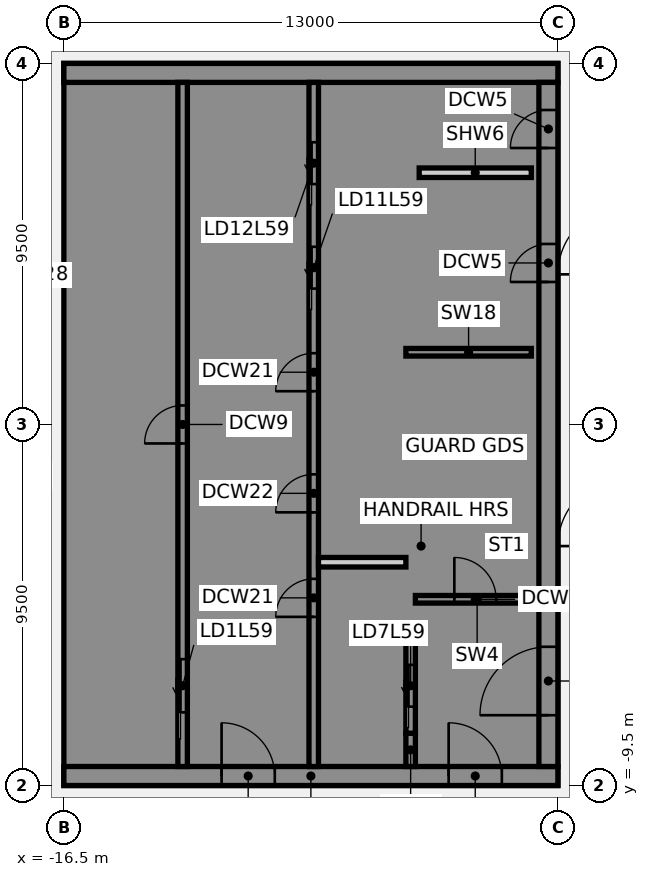
"""IFC4 building model, lengths in metres.
Left out: names, types, materials, properties, quantities, classifications, styles, units other than length and angle.
Written with IfcOpenShell. Run it as: python <this file> out.ifc"""

import sys

from ifc_helpers import new_model, si_unit, direction, frame, frame_2d, origin, place, context, subcontext, project, spatial, polyline, rectangle, outline, extrude, element, fill, save


model = new_model("IFC4")
c1 = context("Model", 3, precision=1e-05, world=origin(), true_north=direction((0.0, 1.0)))
c2 = subcontext(c1, "Body", "Model", "MODEL_VIEW")
j1 = project(units=[si_unit("LENGTHUNIT", "METRE"), si_unit("PLANEANGLEUNIT", "RADIAN")], contexts=[c1])
p1 = place(None, origin())
s1 = spatial("IfcSite", under=j1, at=p1, CompositionType="ELEMENT")
p2 = place(p1, origin())
s2 = spatial("IfcBuilding", under=s1, at=p2, CompositionType="ELEMENT")
p3 = place(p2, frame((0.0, 0.0, 234.3)))
s3 = spatial("IfcBuildingStorey", under=s2, at=p3, CompositionType="ELEMENT", Elevation=234.3)
p4 = place(p3, frame((-16.5, -9.25, 0.0), z_axis=(0.0, 0.0, 1.0), x_axis=(1.0, 0.0, 0.0)))
e1 = element("IfcWall", 1, at=p4, inside=s3, PredefinedType="SHEAR", context=c2, shape_type="SweptSolid", body=[
    extrude(rectangle(XDim=13.0, YDim=0.5, at=frame_2d((6.5, 0.0))), origin(), (0.0, 0.0, 1.0), 3.46),
])
p5 = place(p4, frame((4.15, 0.0, 0.0)))
e2 = element("IfcOpeningElement", 2, at=p5, cuts=e1, PredefinedType="OPENING", context=c2, shape_type="SweptSolid", body=[
    extrude(rectangle(XDim=1.4, YDim=2.1, at=frame_2d((0.7, 1.05))), frame((0.0, 0.26, 0.0), z_axis=(0.0, -1.0, 0.0), x_axis=(1.0, 0.0, 0.0)), (0.0, 0.0, 1.0), 0.52),
])
p6 = place(p4, frame((10.125, 0.0, 0.0)))
e3 = element("IfcOpeningElement", 3, at=p6, cuts=e1, PredefinedType="OPENING", context=c2, shape_type="SweptSolid", body=[
    extrude(rectangle(XDim=1.4, YDim=2.1, at=frame_2d((0.7, 1.05))), frame((0.0, 0.26, 0.0), z_axis=(0.0, -1.0, 0.0), x_axis=(1.0, 0.0, 0.0)), (0.0, 0.0, 1.0), 0.52),
])
p7 = place(p3, origin())
e4 = element("IfcWall", 4, at=p7, inside=s3, PredefinedType="SHEAR", context=c2, shape_type="SweptSolid", body=[
    extrude(outline(polyline([(-13.5, -8.125), (-16.0, -8.125), (-16.0, -5.625), (-13.5, -5.625), (-13.5, -5.375), (-16.0, -5.375), (-16.0, 5.375), (-13.5, 5.375), (-13.5, 5.625), (-16.0, 5.625), (-16.0, 8.125), (-13.5, 8.125), (-13.5, 9.0), (-16.0, 9.0), (-16.5, 9.0), (-16.5, -9.0), (-16.0, -9.0), (-13.5, -9.0), (-13.5, -8.125)])), origin(), (0.0, 0.0, 1.0), 3.46),
])
p8 = place(p3, frame((-16.5, 9.25, 0.0), z_axis=(0.0, 0.0, 1.0), x_axis=(1.0, 0.0, 0.0)))
e5 = element("IfcWall", 5, at=p8, inside=s3, PredefinedType="SHEAR", context=c2, shape_type="SweptSolid", body=[
    extrude(rectangle(XDim=13.0, YDim=0.5, at=frame_2d((6.5, 0.0))), origin(), (0.0, 0.0, 1.0), 3.46),
])
p9 = place(p3, origin())
e6 = element("IfcWall", 6, at=p9, inside=s3, PredefinedType="SHEAR", context=c2, shape_type="SweptSolid", body=[
    extrude(outline(polyline([(-9.8, -5.375), (-9.8, -5.625), (-7.5, -5.625), (-7.25, -5.625), (-7.25, 9.0), (-7.5, 9.0), (-9.8, 9.0), (-9.8, 8.125), (-7.5, 8.125), (-7.5, 5.625), (-9.8, 5.625), (-9.8, 5.375), (-7.5, 5.375), (-7.5, 2.875), (-9.8, 2.875), (-9.8, 2.625), (-7.5, 2.625), (-7.5, -5.375), (-9.8, -5.375)])), origin(), (0.0, 0.0, 1.0), 3.46),
])
p10 = place(p3, origin())
e7 = element("IfcWall", 7, at=p10, inside=s3, PredefinedType="SHEAR", context=c2, shape_type="SweptSolid", body=[
    extrude(outline(polyline([(-7.5, -8.125), (-9.55, -8.125), (-9.55, -5.625), (-9.8, -5.625), (-9.8, -8.125), (-9.8, -9.0), (-7.5, -9.0), (-7.5, -8.125)])), origin(), (0.0, 0.0, 1.0), 3.46),
])
p11 = place(p3, frame((-7.375, -9.0, 0.0), z_axis=(0.0, 0.0, 1.0), x_axis=(0.0, 1.0, 0.0)))
e8 = element("IfcWall", 8, at=p11, inside=s3, PredefinedType="SHEAR", context=c2, shape_type="SweptSolid", body=[
    extrude(rectangle(XDim=0.875, YDim=0.25, at=frame_2d((0.438, 0.0))), origin(), (0.0, 0.0, 1.0), 3.46),
])
p12 = place(p3, frame((-7.5, 1.9, 0.0), z_axis=(0.0, 0.0, 1.0), x_axis=(1.0, 0.0, 0.0)))
e9 = element("IfcWall", 9, at=p12, inside=s3, PredefinedType="SHEAR", context=c2, shape_type="SweptSolid", body=[
    extrude(rectangle(XDim=3.3, YDim=0.2, at=frame_2d((1.65, 0.0))), origin(), (0.0, 0.0, 1.0), 3.46),
])
p13 = place(p3, frame((-13.375, -9.0, 0.0), z_axis=(0.0, 0.0, 1.0), x_axis=(0.0, 1.0, 0.0)))
e10 = element("IfcWall", 10, at=p13, inside=s3, PredefinedType="SHEAR", context=c2, shape_type="SweptSolid", body=[
    extrude(rectangle(XDim=18.0, YDim=0.25, at=frame_2d((9.0, 0.0))), origin(), (0.0, 0.0, 1.0), 3.46),
])
p14 = place(p13, frame((1.425, 0.0, 0.0)))
e11 = element("IfcOpeningElement", 11, at=p14, cuts=e10, PredefinedType="OPENING", context=c2, shape_type="SweptSolid", body=[
    extrude(rectangle(XDim=1.4, YDim=2.1, at=frame_2d((0.7, 1.05))), frame((0.0, 0.135, 0.0), z_axis=(0.0, -1.0, 0.0), x_axis=(1.0, 0.0, 0.0)), (0.0, 0.0, 1.0), 0.27),
])
p15 = place(p13, frame((8.5, 0.0, 0.0)))
e12 = element("IfcOpeningElement", 12, at=p15, cuts=e10, PredefinedType="OPENING", context=c2, shape_type="SweptSolid", body=[
    extrude(rectangle(XDim=1.0, YDim=2.1, at=frame_2d((0.5, 1.05))), frame((0.0, 0.135, 0.0), z_axis=(0.0, -1.0, 0.0), x_axis=(1.0, 0.0, 0.0)), (0.0, 0.0, 1.0), 0.27),
])
p16 = place(p3, frame((-9.925, -9.0, 0.0), z_axis=(0.0, 0.0, 1.0), x_axis=(0.0, 1.0, 0.0)))
e13 = element("IfcWall", 13, at=p16, inside=s3, PredefinedType="SHEAR", context=c2, shape_type="SweptSolid", body=[
    extrude(rectangle(XDim=18.0, YDim=0.25, at=frame_2d((9.0, 0.0))), origin(), (0.0, 0.0, 1.0), 3.46),
])
p17 = place(p16, frame((12.575, 0.0, 0.0)))
e14 = element("IfcOpeningElement", 14, at=p17, cuts=e13, PredefinedType="OPENING", context=c2, shape_type="SweptSolid", body=[
    extrude(rectangle(XDim=1.1, YDim=2.1, at=frame_2d((0.55, 1.05))), frame((0.0, 0.135, 0.0), z_axis=(0.0, -1.0, 0.0), x_axis=(1.0, 0.0, 0.0)), (0.0, 0.0, 1.0), 0.27),
])
p18 = place(p16, frame((15.325, 0.0, 0.0)))
e15 = element("IfcOpeningElement", 15, at=p18, cuts=e13, PredefinedType="OPENING", context=c2, shape_type="SweptSolid", body=[
    extrude(rectangle(XDim=1.1, YDim=2.1, at=frame_2d((0.55, 1.05))), frame((0.0, 0.135, 0.0), z_axis=(0.0, -1.0, 0.0), x_axis=(1.0, 0.0, 0.0)), (0.0, 0.0, 1.0), 0.27),
])
p19 = place(p16, frame((3.938, 0.0, 0.0)))
e16 = element("IfcOpeningElement", 16, at=p19, cuts=e13, PredefinedType="OPENING", context=c2, shape_type="SweptSolid", body=[
    extrude(rectangle(XDim=1.0, YDim=2.1, at=frame_2d((0.5, 1.05))), frame((0.0, 0.135, 0.0), z_axis=(0.0, -1.0, 0.0), x_axis=(1.0, 0.0, 0.0)), (0.0, 0.0, 1.0), 0.27),
])
p20 = place(p16, frame((6.688, 0.0, 0.0)))
e17 = element("IfcOpeningElement", 17, at=p20, cuts=e13, PredefinedType="OPENING", context=c2, shape_type="SweptSolid", body=[
    extrude(rectangle(XDim=1.0, YDim=2.1, at=frame_2d((0.5, 1.05))), frame((0.0, 0.135, 0.0), z_axis=(0.0, -1.0, 0.0), x_axis=(1.0, 0.0, 0.0)), (0.0, 0.0, 1.0), 0.27),
])
p21 = place(p16, frame((9.875, 0.0, 0.0)))
e18 = element("IfcOpeningElement", 18, at=p21, cuts=e13, PredefinedType="OPENING", context=c2, shape_type="SweptSolid", body=[
    extrude(rectangle(XDim=1.0, YDim=2.1, at=frame_2d((0.5, 1.05))), frame((0.0, 0.135, 0.0), z_axis=(0.0, -1.0, 0.0), x_axis=(1.0, 0.0, 0.0)), (0.0, 0.0, 1.0), 0.27),
])
p22 = place(p3, frame((-7.375, -8.125, 0.0), z_axis=(0.0, 0.0, 1.0), x_axis=(0.0, 1.0, 0.0)))
e19 = element("IfcWall", 19, at=p22, inside=s3, PredefinedType="SHEAR", context=c2, shape_type="SweptSolid", body=[
    extrude(rectangle(XDim=2.5, YDim=0.25, at=frame_2d((1.25, 0.0))), origin(), (0.0, 0.0, 1.0), 3.46),
])
p23 = place(p22, frame((0.7, 0.0, 0.0)))
e20 = element("IfcOpeningElement", 20, at=p23, cuts=e19, PredefinedType="OPENING", context=c2, shape_type="SweptSolid", body=[
    extrude(rectangle(XDim=1.1, YDim=2.1, at=frame_2d((0.55, 1.05))), frame((0.0, 0.135, 0.0), z_axis=(0.0, -1.0, 0.0), x_axis=(1.0, 0.0, 0.0)), (0.0, 0.0, 1.0), 0.27),
])
p24 = place(p3, frame((-3.75, -9.0, 0.0), z_axis=(0.0, 0.0, 1.0), x_axis=(0.0, 1.0, 0.0)))
e21 = element("IfcWall", 21, at=p24, inside=s3, PredefinedType="SHEAR", context=c2, shape_type="SweptSolid", body=[
    extrude(rectangle(XDim=18.0, YDim=0.5, at=frame_2d((9.0, 0.0))), origin(), (0.0, 0.0, 1.0), 3.46),
])
p25 = place(p24, frame((1.35, 0.0, 0.0)))
e22 = element("IfcOpeningElement", 22, at=p25, cuts=e21, PredefinedType="OPENING", context=c2, shape_type="SweptSolid", body=[
    extrude(rectangle(XDim=1.8, YDim=2.1, at=frame_2d((0.9, 1.05))), frame((0.0, 0.26, 0.0), z_axis=(0.0, -1.0, 0.0), x_axis=(1.0, 0.0, 0.0)), (0.0, 0.0, 1.0), 0.52),
])
p26 = place(p24, frame((12.75, 0.0, 0.0)))
e23 = element("IfcOpeningElement", 23, at=p26, cuts=e21, PredefinedType="OPENING", context=c2, shape_type="SweptSolid", body=[
    extrude(rectangle(XDim=1.0, YDim=2.1, at=frame_2d((0.5, 1.05))), frame((0.0, 0.26, 0.0), z_axis=(0.0, -1.0, 0.0), x_axis=(1.0, 0.0, 0.0)), (0.0, 0.0, 1.0), 0.52),
])
p27 = place(p24, frame((16.274, 0.0, 0.0)))
e24 = element("IfcOpeningElement", 24, at=p27, cuts=e21, PredefinedType="OPENING", context=c2, shape_type="SweptSolid", body=[
    extrude(rectangle(XDim=1.0, YDim=2.1, at=frame_2d((0.5, 1.05))), frame((0.0, 0.26, 0.0), z_axis=(0.0, -1.0, 0.0), x_axis=(1.0, 0.0, 0.0)), (0.0, 0.0, 1.0), 0.52),
])
p28 = place(p3, frame((-7.15, 6.624, 0.0), z_axis=(0.0, 0.0, 1.0), x_axis=(1.0, 0.0, 0.0)))
e25 = element("IfcWall", 25, at=p28, inside=s3, PredefinedType="PARTITIONING", context=c2, shape_type="SweptSolid", body=[
    extrude(rectangle(XDim=2.95, YDim=0.25, at=frame_2d((1.475, 0.0))), origin(), (0.0, 0.0, 1.0), 3.46),
])
p29 = place(p3, frame((-7.25, -4.6, 0.0), z_axis=(0.0, 0.0, 1.0), x_axis=(1.0, 0.0, 0.0)))
e26 = element("IfcWall", 26, at=p29, inside=s3, PredefinedType="SHEAR", context=c2, shape_type="SweptSolid", body=[
    extrude(rectangle(XDim=3.25, YDim=0.2, at=frame_2d((1.625, 0.0))), origin(), (0.0, 0.0, 1.0), 3.46),
])
p30 = place(p29, frame((1.025, 0.0, 0.0)))
e27 = element("IfcOpeningElement", 27, at=p30, cuts=e26, PredefinedType="OPENING", context=c2, shape_type="SweptSolid", body=[
    extrude(rectangle(XDim=1.1, YDim=2.1, at=frame_2d((0.55, 1.05))), frame((0.0, 0.11, 0.0), z_axis=(0.0, -1.0, 0.0), x_axis=(1.0, 0.0, 0.0)), (0.0, 0.0, 1.0), 0.22),
])
p31 = place(p3, frame((-9.8, -3.625, 0.0), z_axis=(0.0, 0.0, 1.0), x_axis=(1.0, 0.0, 0.0)))
e28 = element("IfcWall", 28, at=p31, inside=s3, PredefinedType="PARTITIONING", context=c2, shape_type="SweptSolid", body=[
    extrude(rectangle(XDim=2.3, YDim=0.25, at=frame_2d((1.15, 0.0))), origin(), (0.0, 0.0, 1.0), 3.46),
])
p32 = place(p5, origin())
e29 = element("IfcDoor", 29, at=p32, inside=s3, OperationType="SINGLE_SWING_LEFT", PredefinedType="DOOR", context=c2, shape_type="SweptSolid", body=[
    extrude(rectangle(XDim=1.4, YDim=2.1, at=frame_2d((0.7, 1.05))), frame((0.0, 0.025, 0.0), z_axis=(0.0, -1.0, 0.0), x_axis=(1.0, 0.0, 0.0)), (0.0, 0.0, 1.0), 0.05),
])
fill(e2, e29)
p33 = place(p6, origin())
e30 = element("IfcDoor", 30, at=p33, inside=s3, OperationType="SINGLE_SWING_LEFT", PredefinedType="DOOR", context=c2, shape_type="SweptSolid", body=[
    extrude(rectangle(XDim=1.4, YDim=2.1, at=frame_2d((0.7, 1.05))), frame((0.0, 0.025, 0.0), z_axis=(0.0, -1.0, 0.0), x_axis=(1.0, 0.0, 0.0)), (0.0, 0.0, 1.0), 0.05),
])
fill(e3, e30)
p34 = place(p25, origin())
e31 = element("IfcDoor", 31, at=p34, inside=s3, OperationType="SINGLE_SWING_LEFT", PredefinedType="DOOR", context=c2, shape_type="SweptSolid", body=[
    extrude(rectangle(XDim=1.8, YDim=2.1, at=frame_2d((0.9, 1.05))), frame((0.0, 0.025, 0.0), z_axis=(0.0, -1.0, 0.0), x_axis=(1.0, 0.0, 0.0)), (0.0, 0.0, 1.0), 0.05),
])
fill(e22, e31)
p35 = place(p26, origin())
e32 = element("IfcDoor", 32, at=p35, inside=s3, OperationType="SINGLE_SWING_LEFT", PredefinedType="DOOR", context=c2, shape_type="SweptSolid", body=[
    extrude(rectangle(XDim=1.0, YDim=2.1, at=frame_2d((0.5, 1.05))), frame((0.0, 0.225, 0.0), z_axis=(0.0, -1.0, 0.0), x_axis=(1.0, 0.0, 0.0)), (0.0, 0.0, 1.0), 0.05),
])
fill(e23, e32)
p36 = place(p27, origin())
e33 = element("IfcDoor", 33, at=p36, inside=s3, OperationType="SINGLE_SWING_LEFT", PredefinedType="DOOR", context=c2, shape_type="SweptSolid", body=[
    extrude(rectangle(XDim=1.0, YDim=2.1, at=frame_2d((0.5, 1.05))), frame((0.0, 0.225, 0.0), z_axis=(0.0, -1.0, 0.0), x_axis=(1.0, 0.0, 0.0)), (0.0, 0.0, 1.0), 0.05),
])
fill(e24, e33)
p37 = place(p30, origin())
e34 = element("IfcDoor", 34, at=p37, inside=s3, OperationType="SINGLE_SWING_LEFT", PredefinedType="DOOR", context=c2, shape_type="SweptSolid", body=[
    extrude(rectangle(XDim=1.1, YDim=2.1, at=frame_2d((0.55, 1.05))), frame((0.0, 0.025, 0.0), z_axis=(0.0, -1.0, 0.0), x_axis=(1.0, 0.0, 0.0)), (0.0, 0.0, 1.0), 0.05),
])
fill(e27, e34)
p38 = place(p14, origin())
e35 = element("IfcDoor", 35, at=p38, inside=s3, OperationType="SLIDING_TO_LEFT", PredefinedType="DOOR", context=c2, shape_type="SweptSolid", body=[
    extrude(rectangle(XDim=1.4, YDim=2.1, at=frame_2d((0.7, 1.05))), frame((0.0, 0.025, 0.0), z_axis=(0.0, -1.0, 0.0), x_axis=(1.0, 0.0, 0.0)), (0.0, 0.0, 1.0), 0.05),
])
fill(e11, e35)
p39 = place(p23, origin())
e36 = element("IfcDoor", 36, at=p39, inside=s3, OperationType="SLIDING_TO_LEFT", PredefinedType="DOOR", context=c2, shape_type="SweptSolid", body=[
    extrude(rectangle(XDim=1.1, YDim=2.1, at=frame_2d((0.55, 1.05))), frame((0.0, 0.025, 0.0), z_axis=(0.0, -1.0, 0.0), x_axis=(1.0, 0.0, 0.0)), (0.0, 0.0, 1.0), 0.05),
])
fill(e20, e36)
p40 = place(p17, origin())
e37 = element("IfcDoor", 37, at=p40, inside=s3, OperationType="SLIDING_TO_LEFT", PredefinedType="DOOR", context=c2, shape_type="SweptSolid", body=[
    extrude(rectangle(XDim=1.1, YDim=2.1, at=frame_2d((0.55, 1.05))), frame((0.0, 0.025, 0.0), z_axis=(0.0, -1.0, 0.0), x_axis=(1.0, 0.0, 0.0)), (0.0, 0.0, 1.0), 0.05),
])
fill(e14, e37)
p41 = place(p18, origin())
e38 = element("IfcDoor", 38, at=p41, inside=s3, OperationType="SLIDING_TO_LEFT", PredefinedType="DOOR", context=c2, shape_type="SweptSolid", body=[
    extrude(rectangle(XDim=1.1, YDim=2.1, at=frame_2d((0.55, 1.05))), frame((0.0, 0.025, 0.0), z_axis=(0.0, -1.0, 0.0), x_axis=(1.0, 0.0, 0.0)), (0.0, 0.0, 1.0), 0.05),
])
fill(e15, e38)
p42 = place(p15, origin())
e39 = element("IfcDoor", 39, at=p42, inside=s3, OperationType="SINGLE_SWING_LEFT", PredefinedType="DOOR", context=c2, shape_type="SweptSolid", body=[
    extrude(rectangle(XDim=1.0, YDim=2.1, at=frame_2d((0.5, 1.05))), frame((0.0, 0.025, 0.0), z_axis=(0.0, -1.0, 0.0), x_axis=(1.0, 0.0, 0.0)), (0.0, 0.0, 1.0), 0.05),
])
fill(e12, e39)
p43 = place(p19, origin())
e40 = element("IfcDoor", 40, at=p43, inside=s3, OperationType="SINGLE_SWING_LEFT", PredefinedType="DOOR", context=c2, shape_type="SweptSolid", body=[
    extrude(rectangle(XDim=1.0, YDim=2.1, at=frame_2d((0.5, 1.05))), frame((0.0, 0.025, 0.0), z_axis=(0.0, -1.0, 0.0), x_axis=(1.0, 0.0, 0.0)), (0.0, 0.0, 1.0), 0.05),
])
fill(e16, e40)
p44 = place(p20, origin())
e41 = element("IfcDoor", 41, at=p44, inside=s3, OperationType="SINGLE_SWING_LEFT", PredefinedType="DOOR", context=c2, shape_type="SweptSolid", body=[
    extrude(rectangle(XDim=1.0, YDim=2.1, at=frame_2d((0.5, 1.05))), frame((0.0, 0.025, 0.0), z_axis=(0.0, -1.0, 0.0), x_axis=(1.0, 0.0, 0.0)), (0.0, 0.0, 1.0), 0.05),
])
fill(e17, e41)
p45 = place(p21, origin())
e42 = element("IfcDoor", 42, at=p45, inside=s3, OperationType="SINGLE_SWING_LEFT", PredefinedType="DOOR", context=c2, shape_type="SweptSolid", body=[
    extrude(rectangle(XDim=1.0, YDim=2.1, at=frame_2d((0.5, 1.05))), frame((0.0, 0.025, 0.0), z_axis=(0.0, -1.0, 0.0), x_axis=(1.0, 0.0, 0.0)), (0.0, 0.0, 1.0), 0.05),
])
fill(e18, e42)
save(model, sys.argv[1])
